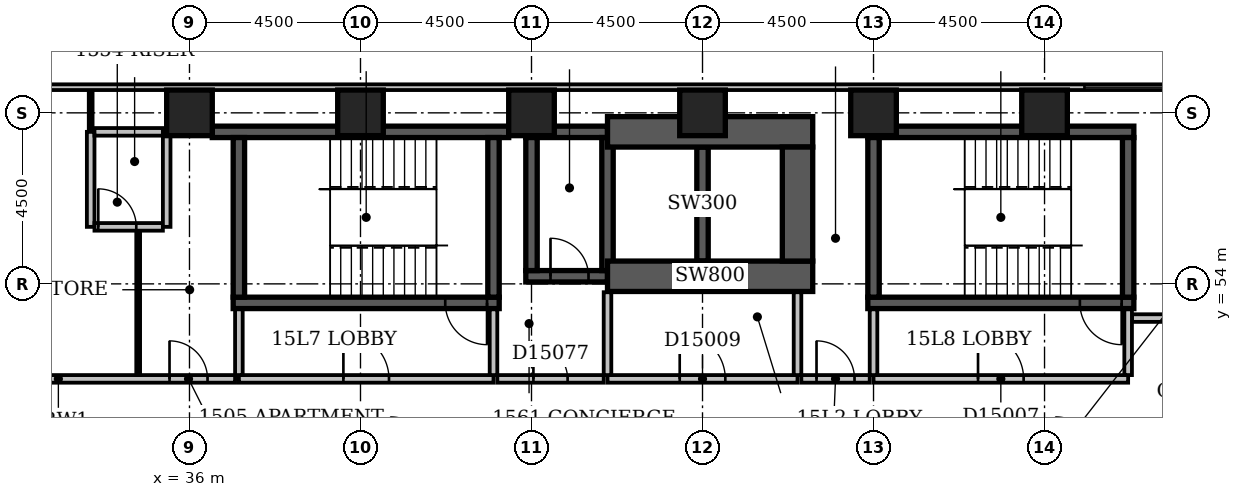
"""IFC4 building model, lengths in metres.
Left out: names, types, materials, properties, quantities, classifications, styles, units other than length and angle.
Written with IfcOpenShell. Run it as: python <this file> out.ifc"""

import sys

from ifc_helpers import new_model, si_unit, direction, frame, frame_2d, origin, origin_2d, place, context, subcontext, project, spatial, rectangle, extrude, element, fill, save


model = new_model("IFC4")
c1 = context("Model", 3, precision=1e-05, world=origin(), true_north=direction((0.0, 1.0)))
c2 = subcontext(c1, "Body", "Model", "MODEL_VIEW")
j1 = project(units=[si_unit("LENGTHUNIT", "METRE"), si_unit("PLANEANGLEUNIT", "RADIAN")], contexts=[c1])
p1 = place(None, origin())
s1 = spatial("IfcSite", under=j1, at=p1, CompositionType="ELEMENT")
p2 = place(p1, origin())
s2 = spatial("IfcBuilding", under=s1, at=p2, CompositionType="ELEMENT")
p3 = place(p2, frame((0.0, 0.0, 65.0)))
s3 = spatial("IfcBuildingStorey", under=s2, at=p3, CompositionType="ELEMENT", Elevation=65.0)
p4 = place(p3, frame((36.6, 58.0, -0.3), z_axis=(0.0, 0.0, 1.0), x_axis=(1.0, 0.0, 0.0)))
e1 = element("IfcWall", 1, at=p4, inside=s3, PredefinedType="SHEAR", context=c2, shape_type="SweptSolid", body=[
    extrude(rectangle(XDim=7.8, YDim=0.3, at=frame_2d((3.9, 0.0))), origin(), (0.0, 0.0, 1.0), 3.6),
])
p5 = place(p3, frame((37.15, 53.5, -0.3), z_axis=(0.0, 0.0, 1.0), x_axis=(1.0, 0.0, 0.0)))
e2 = element("IfcWall", 2, at=p5, inside=s3, PredefinedType="SHEAR", context=c2, shape_type="SweptSolid", body=[
    extrude(rectangle(XDim=7.0, YDim=0.3, at=frame_2d((3.5, 0.0))), origin(), (0.0, 0.0, 1.0), 3.6),
])
p6 = place(p5, frame((5.58, 0.0, 0.3)))
e3 = element("IfcOpeningElement", 3, at=p6, cuts=e2, PredefinedType="OPENING", context=c2, shape_type="SweptSolid", body=[
    extrude(rectangle(XDim=1.1, YDim=2.1, at=frame_2d((0.55, 1.05))), frame((0.0, 0.162, 0.0), z_axis=(0.0, -1.0, 0.0), x_axis=(1.0, 0.0, 0.0)), (0.0, 0.0, 1.0), 0.324),
])
for number, where, z_axis, x_axis in (
    (4, (37.3, 53.65, -0.3), (0.0, 0.0, 1.0), (0.0, 1.0, 0.0)),
    (5, (44.0, 53.65, -0.3), (0.0, 0.0, 1.0), (0.0, 1.0, 0.0)),
):
    element("IfcWall", number, at=place(p3, frame(where, z_axis=z_axis, x_axis=x_axis)), inside=s3, PredefinedType="SHEAR", context=c2, shape_type="SweptSolid", body=[
        extrude(rectangle(XDim=4.2, YDim=0.3, at=frame_2d((2.1, 0.0))), origin(), (0.0, 0.0, 1.0), 3.6),
    ])
p7 = place(p3, frame((44.85, 54.2, -0.3), z_axis=(0.0, 0.0, 1.0), x_axis=(1.0, 0.0, 0.0)))
e6 = element("IfcWall", 6, at=p7, inside=s3, PredefinedType="SHEAR", context=c2, shape_type="SweptSolid", body=[
    extrude(rectangle(XDim=2.15, YDim=0.3, at=frame_2d((1.075, 0.0))), origin(), (0.0, 0.0, 1.0), 3.6),
])
p8 = place(p7, frame((0.65, 0.0, 0.3)))
e7 = element("IfcOpeningElement", 7, at=p8, cuts=e6, PredefinedType="OPENING", context=c2, shape_type="SweptSolid", body=[
    extrude(rectangle(XDim=1.0, YDim=2.1, at=frame_2d((0.5, 1.05))), frame((0.0, 0.162, 0.0), z_axis=(0.0, -1.0, 0.0), x_axis=(1.0, 0.0, 0.0)), (0.0, 0.0, 1.0), 0.324),
])
p9 = place(p3, frame((44.85, 58.0, -0.3), z_axis=(0.0, 0.0, 1.0), x_axis=(1.0, 0.0, 0.0)))
e8 = element("IfcWall", 8, at=p9, inside=s3, PredefinedType="SHEAR", context=c2, shape_type="SweptSolid", body=[
    extrude(rectangle(XDim=2.15, YDim=0.3, at=frame_2d((1.075, 0.0))), origin(), (0.0, 0.0, 1.0), 3.6),
])
p10 = place(p3, frame((45.0, 54.35, -0.3), z_axis=(0.0, 0.0, 1.0), x_axis=(0.0, 1.0, 0.0)))
e9 = element("IfcWall", 9, at=p10, inside=s3, PredefinedType="SHEAR", context=c2, shape_type="SweptSolid", body=[
    extrude(rectangle(XDim=3.5, YDim=0.3, at=frame_2d((1.75, 0.0))), origin(), (0.0, 0.0, 1.0), 3.6),
])
p11 = place(p3, frame((47.0, 54.2, -0.3), z_axis=(0.0, 0.0, 1.0), x_axis=(1.0, 0.0, 0.0)))
e10 = element("IfcWall", 10, at=p11, inside=s3, PredefinedType="SHEAR", context=c2, shape_type="SweptSolid", body=[
    extrude(rectangle(XDim=5.4, YDim=0.8, at=frame_2d((2.7, 0.0))), origin(), (0.0, 0.0, 1.0), 3.6),
])
p12 = place(p3, frame((47.0, 54.35, -0.3), z_axis=(0.0, 0.0, 1.0), x_axis=(0.0, 1.0, 0.0)))
e11 = element("IfcWall", 11, at=p12, inside=s3, PredefinedType="SHEAR", context=c2, shape_type="SweptSolid", body=[
    extrude(rectangle(XDim=3.5, YDim=0.3, at=frame_2d((1.75, 0.0))), origin(), (0.0, 0.0, 1.0), 3.6),
])
p13 = place(p3, frame((47.0, 58.0, -0.3), z_axis=(0.0, 0.0, 1.0), x_axis=(1.0, 0.0, 0.0)))
e12 = element("IfcWall", 12, at=p13, inside=s3, PredefinedType="SHEAR", context=c2, shape_type="SweptSolid", body=[
    extrude(rectangle(XDim=5.4, YDim=0.8, at=frame_2d((2.7, 0.0))), origin(), (0.0, 0.0, 1.0), 3.6),
])
p14 = place(p3, frame((49.5, 54.6, -0.3), z_axis=(0.0, 0.0, 1.0), x_axis=(0.0, 1.0, 0.0)))
e13 = element("IfcWall", 13, at=p14, inside=s3, PredefinedType="SHEAR", context=c2, shape_type="SweptSolid", body=[
    extrude(rectangle(XDim=3.0, YDim=0.3, at=frame_2d((1.5, 0.0))), origin(), (0.0, 0.0, 1.0), 3.6),
])
p15 = place(p3, frame((52.0, 54.6, -0.3), z_axis=(0.0, 0.0, 1.0), x_axis=(0.0, 1.0, 0.0)))
e14 = element("IfcWall", 14, at=p15, inside=s3, PredefinedType="SHEAR", context=c2, shape_type="SweptSolid", body=[
    extrude(rectangle(XDim=3.0, YDim=0.8, at=frame_2d((1.5, 0.0))), origin(), (0.0, 0.0, 1.0), 3.6),
])
p16 = place(p3, frame((53.85, 53.5, -0.3), z_axis=(0.0, 0.0, 1.0), x_axis=(1.0, 0.0, 0.0)))
e15 = element("IfcWall", 15, at=p16, inside=s3, PredefinedType="SHEAR", context=c2, shape_type="SweptSolid", body=[
    extrude(rectangle(XDim=7.0, YDim=0.3, at=frame_2d((3.5, 0.0))), origin(), (0.0, 0.0, 1.0), 3.6),
])
p17 = place(p16, frame((5.58, 0.0, 0.3)))
e16 = element("IfcOpeningElement", 16, at=p17, cuts=e15, PredefinedType="OPENING", context=c2, shape_type="SweptSolid", body=[
    extrude(rectangle(XDim=1.1, YDim=2.1, at=frame_2d((0.55, 1.05))), frame((0.0, 0.162, 0.0), z_axis=(0.0, -1.0, 0.0), x_axis=(1.0, 0.0, 0.0)), (0.0, 0.0, 1.0), 0.324),
])
p18 = place(p3, frame((53.85, 58.0, -0.3), z_axis=(0.0, 0.0, 1.0), x_axis=(1.0, 0.0, 0.0)))
e17 = element("IfcWall", 17, at=p18, inside=s3, PredefinedType="SHEAR", context=c2, shape_type="SweptSolid", body=[
    extrude(rectangle(XDim=7.0, YDim=0.3, at=frame_2d((3.5, 0.0))), origin(), (0.0, 0.0, 1.0), 3.6),
])
for number, where, z_axis, x_axis in (
    (18, (54.0, 53.65, -0.3), (0.0, 0.0, 1.0), (0.0, 1.0, 0.0)),
    (19, (60.7, 53.65, -0.3), (0.0, 0.0, 1.0), (0.0, 1.0, 0.0)),
):
    element("IfcWall", number, at=place(p3, frame(where, z_axis=z_axis, x_axis=x_axis)), inside=s3, PredefinedType="SHEAR", context=c2, shape_type="SweptSolid", body=[
        extrude(rectangle(XDim=4.2, YDim=0.3, at=frame_2d((2.1, 0.0))), origin(), (0.0, 0.0, 1.0), 3.6),
    ])
for number, where, z_axis, x_axis in (
    (20, (36.0, 58.5, -0.3), (0.0, 0.0, 1.0), (1.0, 0.0, 0.0)),
    (21, (40.5, 58.5, -0.3), (0.0, 0.0, 1.0), (1.0, 0.0, 0.0)),
    (22, (45.0, 58.5, -0.3), (0.0, 0.0, 1.0), (1.0, 0.0, 0.0)),
    (23, (49.5, 58.5, -0.3), (0.0, 0.0, 1.0), (1.0, 0.0, 0.0)),
    (24, (54.0, 58.5, -0.3), (0.0, 0.0, 1.0), (1.0, 0.0, 0.0)),
    (25, (58.5, 58.5, -0.3), (0.0, 0.0, 1.0), (1.0, 0.0, 0.0)),
):
    element("IfcColumn", number, at=place(p3, frame(where, z_axis=z_axis, x_axis=x_axis)), inside=s3, PredefinedType="COLUMN", context=c2, shape_type="SweptSolid", body=[
        extrude(rectangle(XDim=1.2, YDim=1.2, at=origin_2d()), origin(), (0.0, 0.0, 1.0), 3.6),
    ])
p19 = place(p3, frame((68.1, 59.175, 0.0), z_axis=(0.0, 0.0, 1.0), x_axis=(-1.0, 0.0, 0.0)))
e26 = element("IfcWall", 26, at=p19, inside=s3, PredefinedType="STANDARD", context=c2, shape_type="SweptSolid", body=[
    extrude(rectangle(XDim=68.85, YDim=0.15, at=frame_2d((34.425, 0.0))), origin(), (0.0, 0.0, 1.0), 2.7),
])
p20 = place(p19, frame((1.65, 0.0, 0.6)))
e27 = element("IfcOpeningElement", 27, at=p20, cuts=e26, PredefinedType="OPENING", context=c2, shape_type="SweptSolid", body=[
    extrude(rectangle(XDim=2.4, YDim=1.8, at=frame_2d((1.2, 0.9))), frame((0.0, 0.087, 0.0), z_axis=(0.0, -1.0, 0.0), x_axis=(1.0, 0.0, 0.0)), (0.0, 0.0, 1.0), 0.174),
])
p21 = place(p19, frame((6.15, 0.0, 0.6)))
e28 = element("IfcOpeningElement", 28, at=p21, cuts=e26, PredefinedType="OPENING", context=c2, shape_type="SweptSolid", body=[
    extrude(rectangle(XDim=2.4, YDim=1.8, at=frame_2d((1.2, 0.9))), frame((0.0, 0.087, 0.0), z_axis=(0.0, -1.0, 0.0), x_axis=(1.0, 0.0, 0.0)), (0.0, 0.0, 1.0), 0.174),
])
p22 = place(p19, frame((39.002, 0.0, 0.6)))
e29 = element("IfcOpeningElement", 29, at=p22, cuts=e26, PredefinedType="OPENING", context=c2, shape_type="SweptSolid", body=[
    extrude(rectangle(XDim=0.9, YDim=1.8, at=frame_2d((0.45, 0.9))), frame((0.0, 0.087, 0.0), z_axis=(0.0, -1.0, 0.0), x_axis=(1.0, 0.0, 0.0)), (0.0, 0.0, 1.0), 0.174),
])
p23 = place(p3, frame((47.0, 51.5, 0.0), z_axis=(0.0, 0.0, 1.0), x_axis=(1.0, 0.0, 0.0)))
e30 = element("IfcWall", 30, at=p23, inside=s3, PredefinedType="PARTITIONING", context=c2, shape_type="SweptSolid", body=[
    extrude(rectangle(XDim=5.0, YDim=0.2, at=frame_2d((2.5, 0.0))), origin(), (0.0, 0.0, 1.0), 3.3),
])
p24 = place(p23, frame((1.9, 0.0, 0.0)))
e31 = element("IfcOpeningElement", 31, at=p24, cuts=e30, PredefinedType="OPENING", context=c2, shape_type="SweptSolid", body=[
    extrude(rectangle(XDim=1.2, YDim=2.1, at=frame_2d((0.6, 1.05))), frame((0.0, 0.112, 0.0), z_axis=(0.0, -1.0, 0.0), x_axis=(1.0, 0.0, 0.0)), (0.0, 0.0, 1.0), 0.224),
])
for number, where, z_axis, x_axis in (
    (32, (52.0, 51.6, 0.0), (0.0, 0.0, 1.0), (0.0, 1.0, 0.0)),
    (33, (47.0, 51.6, 0.0), (0.0, 0.0, 1.0), (0.0, 1.0, 0.0)),
):
    element("IfcWall", number, at=place(p3, frame(where, z_axis=z_axis, x_axis=x_axis)), inside=s3, PredefinedType="PARTITIONING", context=c2, shape_type="SweptSolid", body=[
        extrude(rectangle(XDim=2.18, YDim=0.2, at=frame_2d((1.09, 0.0))), origin(), (0.0, 0.0, 1.0), 3.3),
    ])
p25 = place(p3, frame((37.3, 51.5, 0.0), z_axis=(0.0, 0.0, 1.0), x_axis=(1.0, 0.0, 0.0)))
e34 = element("IfcWall", 34, at=p25, inside=s3, PredefinedType="PARTITIONING", context=c2, shape_type="SweptSolid", body=[
    extrude(rectangle(XDim=6.7, YDim=0.2, at=frame_2d((3.35, 0.0))), origin(), (0.0, 0.0, 1.0), 3.3),
])
p26 = place(p25, frame((2.75, 0.0, 0.0)))
e35 = element("IfcOpeningElement", 35, at=p26, cuts=e34, PredefinedType="OPENING", context=c2, shape_type="SweptSolid", body=[
    extrude(rectangle(XDim=1.2, YDim=2.1, at=frame_2d((0.6, 1.05))), frame((0.0, 0.112, 0.0), z_axis=(0.0, -1.0, 0.0), x_axis=(1.0, 0.0, 0.0)), (0.0, 0.0, 1.0), 0.224),
])
for number, where, z_axis, x_axis in (
    (36, (44.0, 51.6, 0.0), (0.0, 0.0, 1.0), (0.0, 1.0, 0.0)),
    (37, (37.3, 51.6, 0.0), (0.0, 0.0, 1.0), (0.0, 1.0, 0.0)),
):
    element("IfcWall", number, at=place(p3, frame(where, z_axis=z_axis, x_axis=x_axis)), inside=s3, PredefinedType="PARTITIONING", context=c2, shape_type="SweptSolid", body=[
        extrude(rectangle(XDim=1.73, YDim=0.2, at=frame_2d((0.865, 0.0))), origin(), (0.0, 0.0, 1.0), 3.3),
    ])
p27 = place(p3, frame((54.0, 51.5, 0.0), z_axis=(0.0, 0.0, 1.0), x_axis=(1.0, 0.0, 0.0)))
e38 = element("IfcWall", 38, at=p27, inside=s3, PredefinedType="PARTITIONING", context=c2, shape_type="SweptSolid", body=[
    extrude(rectangle(XDim=6.7, YDim=0.2, at=frame_2d((3.35, 0.0))), origin(), (0.0, 0.0, 1.0), 3.3),
])
p28 = place(p27, frame((2.75, 0.0, 0.0)))
e39 = element("IfcOpeningElement", 39, at=p28, cuts=e38, PredefinedType="OPENING", context=c2, shape_type="SweptSolid", body=[
    extrude(rectangle(XDim=1.2, YDim=2.1, at=frame_2d((0.6, 1.05))), frame((0.0, 0.112, 0.0), z_axis=(0.0, -1.0, 0.0), x_axis=(1.0, 0.0, 0.0)), (0.0, 0.0, 1.0), 0.224),
])
p29 = place(p3, frame((60.7, 51.6, 0.0), z_axis=(0.0, 0.0, 1.0), x_axis=(0.0, 1.0, 0.0)))
e40 = element("IfcWall", 40, at=p29, inside=s3, PredefinedType="PARTITIONING", context=c2, shape_type="SweptSolid", body=[
    extrude(rectangle(XDim=1.73, YDim=0.2, at=frame_2d((0.865, 0.0))), origin(), (0.0, 0.0, 1.0), 3.3),
])
p30 = place(p3, frame((54.0, 51.6, 0.0), z_axis=(0.0, 0.0, 1.0), x_axis=(0.0, 1.0, 0.0)))
e41 = element("IfcWall", 41, at=p30, inside=s3, PredefinedType="PARTITIONING", context=c2, shape_type="SweptSolid", body=[
    extrude(rectangle(XDim=1.73, YDim=0.2, at=frame_2d((0.865, 0.0))), origin(), (0.0, 0.0, 1.0), 2.6),
])
p31 = place(p3, frame((27.9, 51.5, 0.0), z_axis=(0.0, 0.0, 1.0), x_axis=(1.0, 0.0, 0.0)))
e42 = element("IfcWall", 42, at=p31, inside=s3, PredefinedType="PARTITIONING", context=c2, shape_type="SweptSolid", body=[
    extrude(rectangle(XDim=9.3, YDim=0.2, at=frame_2d((4.65, 0.0))), origin(), (0.0, 0.0, 1.0), 3.3),
])
p32 = place(p31, frame((2.875, 0.0, 0.0)))
e43 = element("IfcOpeningElement", 43, at=p32, cuts=e42, PredefinedType="OPENING", context=c2, shape_type="SweptSolid", body=[
    extrude(rectangle(XDim=0.9, YDim=2.1, at=frame_2d((0.45, 1.05))), frame((0.0, 0.112, 0.0), z_axis=(0.0, -1.0, 0.0), x_axis=(1.0, 0.0, 0.0)), (0.0, 0.0, 1.0), 0.224),
])
p33 = place(p31, frame((7.575, 0.0, 0.0)))
e44 = element("IfcOpeningElement", 44, at=p33, cuts=e42, PredefinedType="OPENING", context=c2, shape_type="SweptSolid", body=[
    extrude(rectangle(XDim=1.0, YDim=2.1, at=frame_2d((0.5, 1.05))), frame((0.0, 0.112, 0.0), z_axis=(0.0, -1.0, 0.0), x_axis=(1.0, 0.0, 0.0)), (0.0, 0.0, 1.0), 0.224),
])
p34 = place(p3, frame((44.1, 51.5, 0.0), z_axis=(0.0, 0.0, 1.0), x_axis=(1.0, 0.0, 0.0)))
e45 = element("IfcWall", 45, at=p34, inside=s3, PredefinedType="PARTITIONING", context=c2, shape_type="SweptSolid", body=[
    extrude(rectangle(XDim=2.8, YDim=0.2, at=frame_2d((1.4, 0.0))), origin(), (0.0, 0.0, 1.0), 3.3),
])
p35 = place(p34, frame((0.95, 0.0, 0.0)))
e46 = element("IfcOpeningElement", 46, at=p35, cuts=e45, PredefinedType="OPENING", context=c2, shape_type="SweptSolid", body=[
    extrude(rectangle(XDim=0.9, YDim=2.1, at=frame_2d((0.45, 1.05))), frame((0.0, 0.112, 0.0), z_axis=(0.0, -1.0, 0.0), x_axis=(1.0, 0.0, 0.0)), (0.0, 0.0, 1.0), 0.224),
])
p36 = place(p3, frame((52.1, 51.5, 0.0), z_axis=(0.0, 0.0, 1.0), x_axis=(1.0, 0.0, 0.0)))
e47 = element("IfcWall", 47, at=p36, inside=s3, PredefinedType="PARTITIONING", context=c2, shape_type="SweptSolid", body=[
    extrude(rectangle(XDim=1.8, YDim=0.2, at=frame_2d((0.9, 0.0))), origin(), (0.0, 0.0, 1.0), 3.3),
])
p37 = place(p36, frame((0.4, 0.0, 0.0)))
e48 = element("IfcOpeningElement", 48, at=p37, cuts=e47, PredefinedType="OPENING", context=c2, shape_type="SweptSolid", body=[
    extrude(rectangle(XDim=1.0, YDim=2.1, at=frame_2d((0.5, 1.05))), frame((0.0, 0.112, 0.0), z_axis=(0.0, -1.0, 0.0), x_axis=(1.0, 0.0, 0.0)), (0.0, 0.0, 1.0), 0.224),
])
p38 = place(p3, frame((34.65, 51.6, 0.0), z_axis=(0.0, 0.0, 1.0), x_axis=(0.0, 1.0, 0.0)))
e49 = element("IfcWall", 49, at=p38, inside=s3, PredefinedType="PARTITIONING", context=c2, shape_type="SweptSolid", body=[
    extrude(rectangle(XDim=3.8, YDim=0.1, at=frame_2d((1.9, 0.0))), origin(), (0.0, 0.0, 1.0), 3.3),
])
p39 = place(p3, frame((60.8, 53.1, 0.0), z_axis=(0.0, 0.0, 1.0), x_axis=(1.0, 0.0, 0.0)))
e50 = element("IfcWall", 50, at=p39, inside=s3, PredefinedType="PARTITIONING", context=c2, shape_type="SweptSolid", body=[
    extrude(rectangle(XDim=7.3, YDim=0.2, at=frame_2d((3.65, 0.0))), origin(), (0.0, 0.0, 1.0), 3.3),
])
p40 = place(p39, frame((2.85, 0.0, 0.0)))
e51 = element("IfcOpeningElement", 51, at=p40, cuts=e50, PredefinedType="OPENING", context=c2, shape_type="SweptSolid", body=[
    extrude(rectangle(XDim=0.9, YDim=2.1, at=frame_2d((0.45, 1.05))), frame((0.0, 0.112, 0.0), z_axis=(0.0, -1.0, 0.0), x_axis=(1.0, 0.0, 0.0)), (0.0, 0.0, 1.0), 0.224),
])
p41 = place(p3, frame((33.4, 55.5, 0.0), z_axis=(0.0, 0.0, 1.0), x_axis=(0.0, 1.0, 0.0)))
e52 = element("IfcWall", 52, at=p41, inside=s3, PredefinedType="PARTITIONING", context=c2, shape_type="SweptSolid", body=[
    extrude(rectangle(XDim=2.5, YDim=0.2, at=frame_2d((1.25, 0.0))), origin(), (0.0, 0.0, 1.0), 3.3),
])
p42 = place(p3, frame((33.5, 55.5, 0.0), z_axis=(0.0, 0.0, 1.0), x_axis=(1.0, 0.0, 0.0)))
e53 = element("IfcWall", 53, at=p42, inside=s3, PredefinedType="PARTITIONING", context=c2, shape_type="SweptSolid", body=[
    extrude(rectangle(XDim=1.8, YDim=0.2, at=frame_2d((0.9, 0.0))), origin(), (0.0, 0.0, 1.0), 3.3),
])
p43 = place(p42, frame((0.1, 0.0, 0.0)))
e54 = element("IfcOpeningElement", 54, at=p43, cuts=e53, PredefinedType="OPENING", context=c2, shape_type="SweptSolid", body=[
    extrude(rectangle(XDim=1.0, YDim=2.1, at=frame_2d((0.5, 1.05))), frame((0.0, 0.112, 0.0), z_axis=(0.0, -1.0, 0.0), x_axis=(1.0, 0.0, 0.0)), (0.0, 0.0, 1.0), 0.224),
])
p44 = place(p3, frame((35.4, 55.5, 0.0), z_axis=(0.0, 0.0, 1.0), x_axis=(0.0, 1.0, 0.0)))
e55 = element("IfcWall", 55, at=p44, inside=s3, PredefinedType="PARTITIONING", context=c2, shape_type="SweptSolid", body=[
    extrude(rectangle(XDim=2.5, YDim=0.2, at=frame_2d((1.25, 0.0))), origin(), (0.0, 0.0, 1.0), 2.4),
])
p45 = place(p3, frame((33.4, 58.0, 0.0), z_axis=(0.0, 0.0, 1.0), x_axis=(0.0, 1.0, 0.0)))
e56 = element("IfcWall", 56, at=p45, inside=s3, PredefinedType="PARTITIONING", context=c2, shape_type="SweptSolid", body=[
    extrude(rectangle(XDim=1.1, YDim=0.1, at=frame_2d((0.55, 0.0))), origin(), (0.0, 0.0, 1.0), 3.3),
])
p46 = place(p3, frame((33.5, 58.0, 0.0), z_axis=(0.0, 0.0, 1.0), x_axis=(1.0, 0.0, 0.0)))
e57 = element("IfcWall", 57, at=p46, inside=s3, PredefinedType="PARTITIONING", context=c2, shape_type="SweptSolid", body=[
    extrude(rectangle(XDim=1.8, YDim=0.2, at=frame_2d((0.9, 0.0))), origin(), (0.0, 0.0, 1.0), 3.3),
])
p47 = place(p21, origin())
e58 = element("IfcWindow", 58, at=p47, inside=s3, PartitioningType="SINGLE_PANEL", PredefinedType="WINDOW", context=c2, shape_type="SweptSolid", body=[
    extrude(rectangle(XDim=2.4, YDim=1.8, at=frame_2d((1.2, 0.9))), frame((0.0, 0.03, 0.0), z_axis=(0.0, -1.0, 0.0), x_axis=(1.0, 0.0, 0.0)), (0.0, 0.0, 1.0), 0.06),
])
fill(e28, e58)
p48 = place(p26, origin())
e59 = element("IfcDoor", 59, at=p48, inside=s3, OperationType="SINGLE_SWING_LEFT", PredefinedType="DOOR", context=c2, shape_type="SweptSolid", body=[
    extrude(rectangle(XDim=1.2, YDim=2.1, at=frame_2d((0.6, 1.05))), frame((0.0, 0.025, 0.0), z_axis=(0.0, -1.0, 0.0), x_axis=(1.0, 0.0, 0.0)), (0.0, 0.0, 1.0), 0.05),
])
fill(e35, e59)
p49 = place(p28, origin())
e60 = element("IfcDoor", 60, at=p49, inside=s3, OperationType="SINGLE_SWING_LEFT", PredefinedType="DOOR", context=c2, shape_type="SweptSolid", body=[
    extrude(rectangle(XDim=1.2, YDim=2.1, at=frame_2d((0.6, 1.05))), frame((0.0, 0.025, 0.0), z_axis=(0.0, -1.0, 0.0), x_axis=(1.0, 0.0, 0.0)), (0.0, 0.0, 1.0), 0.05),
])
fill(e39, e60)
p50 = place(p24, origin())
e61 = element("IfcDoor", 61, at=p50, inside=s3, OperationType="SINGLE_SWING_LEFT", PredefinedType="DOOR", context=c2, shape_type="SweptSolid", body=[
    extrude(rectangle(XDim=1.2, YDim=2.1, at=frame_2d((0.6, 1.05))), frame((0.0, 0.025, 0.0), z_axis=(0.0, -1.0, 0.0), x_axis=(1.0, 0.0, 0.0)), (0.0, 0.0, 1.0), 0.05),
])
fill(e31, e61)
p51 = place(p8, origin())
e62 = element("IfcDoor", 62, at=p51, inside=s3, OperationType="SINGLE_SWING_LEFT", PredefinedType="DOOR", context=c2, shape_type="SweptSolid", body=[
    extrude(rectangle(XDim=1.0, YDim=2.1, at=frame_2d((0.5, 1.05))), frame((0.0, 0.025, 0.0), z_axis=(0.0, -1.0, 0.0), x_axis=(1.0, 0.0, 0.0)), (0.0, 0.0, 1.0), 0.05),
])
fill(e7, e62)
p52 = place(p6, origin())
e63 = element("IfcDoor", 63, at=p52, inside=s3, OperationType="SINGLE_SWING_RIGHT", PredefinedType="DOOR", context=c2, shape_type="SweptSolid", body=[
    extrude(rectangle(XDim=1.1, YDim=2.1, at=frame_2d((0.55, 1.05))), frame((0.0, 0.025, 0.0), z_axis=(0.0, -1.0, 0.0), x_axis=(1.0, 0.0, 0.0)), (0.0, 0.0, 1.0), 0.05),
])
fill(e3, e63)
p53 = place(p17, origin())
e64 = element("IfcDoor", 64, at=p53, inside=s3, OperationType="SINGLE_SWING_RIGHT", PredefinedType="DOOR", context=c2, shape_type="SweptSolid", body=[
    extrude(rectangle(XDim=1.1, YDim=2.1, at=frame_2d((0.55, 1.05))), frame((0.0, 0.025, 0.0), z_axis=(0.0, -1.0, 0.0), x_axis=(1.0, 0.0, 0.0)), (0.0, 0.0, 1.0), 0.05),
])
fill(e16, e64)
p54 = place(p33, origin())
e65 = element("IfcDoor", 65, at=p54, inside=s3, OperationType="SINGLE_SWING_LEFT", PredefinedType="DOOR", context=c2, shape_type="SweptSolid", body=[
    extrude(rectangle(XDim=1.0, YDim=2.1, at=frame_2d((0.5, 1.05))), frame((0.0, 0.025, 0.0), z_axis=(0.0, -1.0, 0.0), x_axis=(1.0, 0.0, 0.0)), (0.0, 0.0, 1.0), 0.05),
])
fill(e44, e65)
p55 = place(p35, origin())
e66 = element("IfcDoor", 66, at=p55, inside=s3, OperationType="SINGLE_SWING_LEFT", PredefinedType="DOOR", context=c2, shape_type="SweptSolid", body=[
    extrude(rectangle(XDim=0.9, YDim=2.1, at=frame_2d((0.45, 1.05))), frame((0.0, 0.025, 0.0), z_axis=(0.0, -1.0, 0.0), x_axis=(1.0, 0.0, 0.0)), (0.0, 0.0, 1.0), 0.05),
])
fill(e46, e66)
p56 = place(p37, origin())
e67 = element("IfcDoor", 67, at=p56, inside=s3, OperationType="SINGLE_SWING_LEFT", PredefinedType="DOOR", context=c2, shape_type="SweptSolid", body=[
    extrude(rectangle(XDim=1.0, YDim=2.1, at=frame_2d((0.5, 1.05))), frame((0.0, 0.025, 0.0), z_axis=(0.0, -1.0, 0.0), x_axis=(1.0, 0.0, 0.0)), (0.0, 0.0, 1.0), 0.05),
])
fill(e48, e67)
p57 = place(p43, origin())
e68 = element("IfcDoor", 68, at=p57, inside=s3, OperationType="SINGLE_SWING_LEFT", PredefinedType="DOOR", context=c2, shape_type="SweptSolid", body=[
    extrude(rectangle(XDim=1.0, YDim=2.1, at=frame_2d((0.5, 1.05))), frame((0.0, 0.025, 0.0), z_axis=(0.0, -1.0, 0.0), x_axis=(1.0, 0.0, 0.0)), (0.0, 0.0, 1.0), 0.05),
])
fill(e54, e68)
save(model, sys.argv[1])
